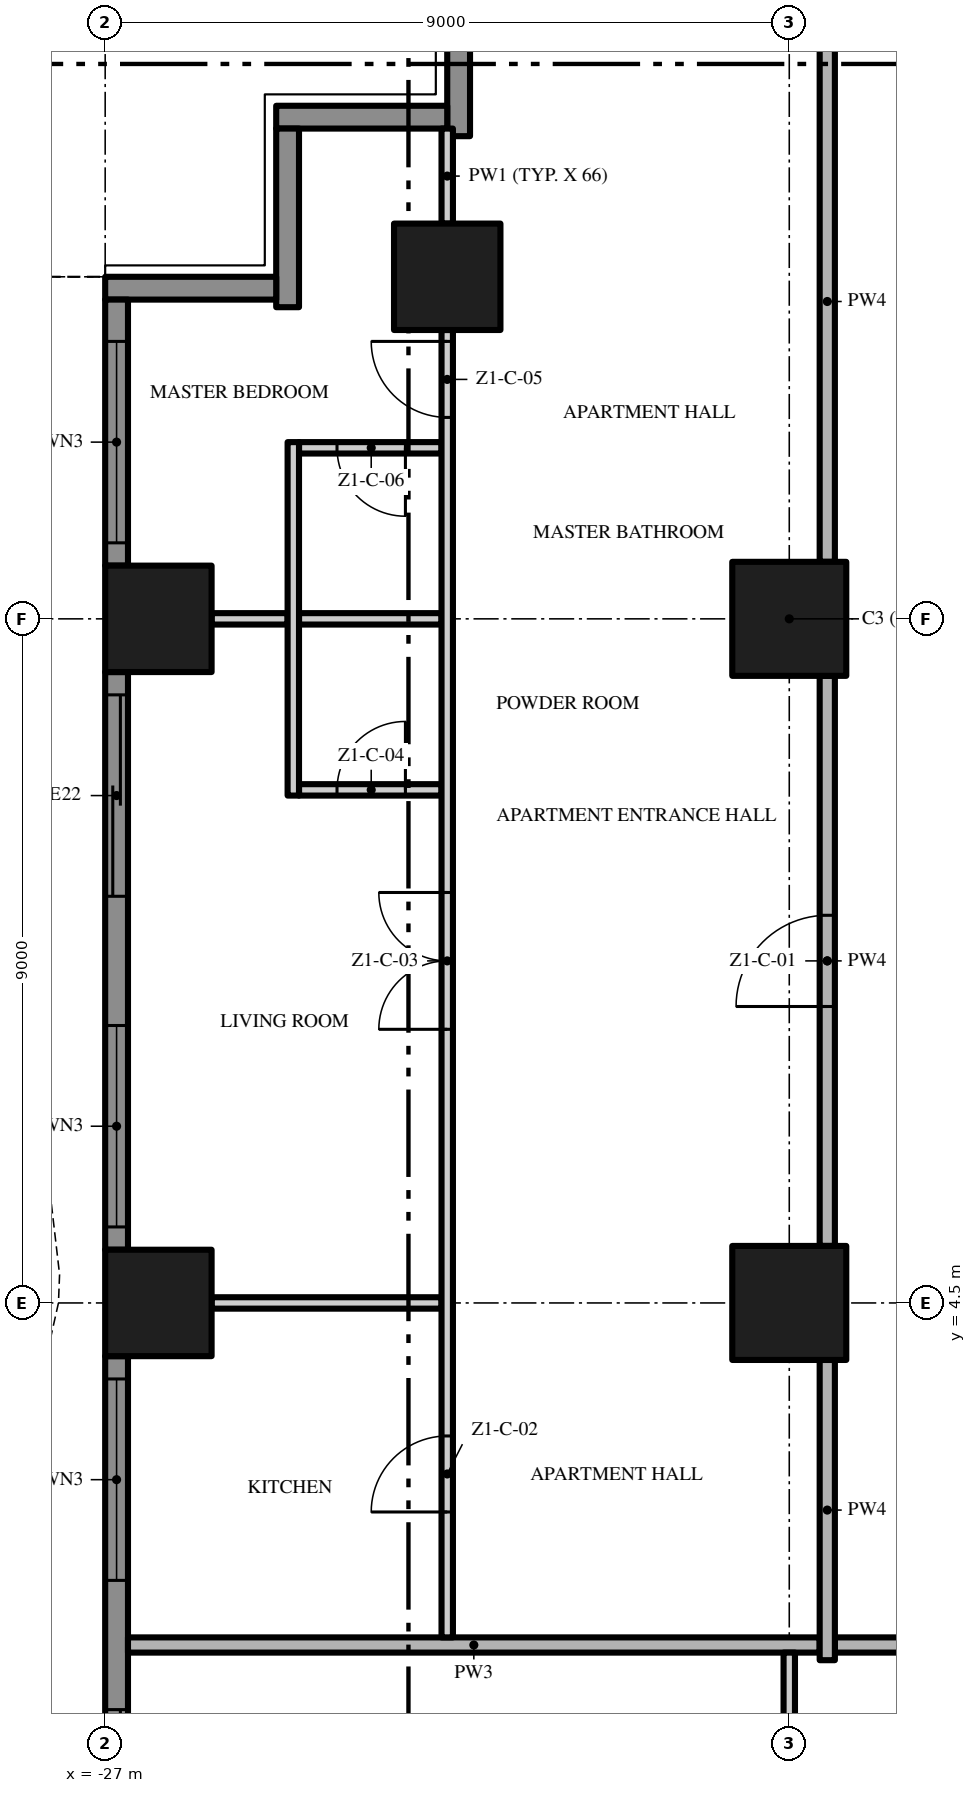
"""IFC4 building model, lengths in metres.
Left out: names, types, materials, properties, quantities, classifications, styles, units other than length and angle.
Written with IfcOpenShell. Run it as: python <this file> out.ifc"""

import sys

from ifc_helpers import new_model, si_unit, direction, frame, frame_2d, origin, origin_2d, place, context, subcontext, project, spatial, polyline, rectangle, outline, extrude, element, fill, save


model = new_model("IFC4")
c1 = context("Model", 3, precision=1e-05, world=origin(), true_north=direction((0.0, 1.0)))
c2 = subcontext(c1, "Body", "Model", "MODEL_VIEW")
j1 = project(units=[si_unit("LENGTHUNIT", "METRE"), si_unit("PLANEANGLEUNIT", "RADIAN")], contexts=[c1])
p1 = place(None, origin())
s1 = spatial("IfcSite", under=j1, at=p1, CompositionType="ELEMENT")
p2 = place(p1, origin())
s2 = spatial("IfcBuilding", under=s1, at=p2, CompositionType="ELEMENT")
p3 = place(p2, frame((0.0, 0.0, 41.6)))
s3 = spatial("IfcBuildingStorey", under=s2, at=p3, CompositionType="ELEMENT", Elevation=41.6)
for number, where, z_axis, x_axis in (
    (1, (-18.0, 13.5, 0.0), (0.0, 0.0, 1.0), (1.0, 0.0, 0.0)),
    (2, (-18.0, 4.5, 0.0), (0.0, 0.0, 1.0), (1.0, 0.0, 0.0)),
):
    element("IfcColumn", number, at=place(p3, frame(where, z_axis=z_axis, x_axis=x_axis)), inside=s3, PredefinedType="COLUMN", context=c2, shape_type="SweptSolid", body=[
        extrude(rectangle(XDim=1.5, YDim=1.5, at=origin_2d()), origin(), (0.0, 0.0, 1.0), 3.5),
    ])
for number, where, z_axis, x_axis in (
    (3, (-26.3, 13.5, 0.0), (0.0, 0.0, 1.0), (1.0, 0.0, 0.0)),
    (4, (-22.5, 18.0, 0.0), (0.0, 0.0, 1.0), (1.0, 0.0, 0.0)),
    (5, (-26.3, 4.5, 0.0), (0.0, 0.0, 1.0), (1.0, 0.0, 0.0)),
):
    element("IfcColumn", number, at=place(p3, frame(where, z_axis=z_axis, x_axis=x_axis)), inside=s3, PredefinedType="COLUMN", context=c2, shape_type="SweptSolid", body=[
        extrude(rectangle(XDim=1.4, YDim=1.4, at=origin_2d()), origin(), (0.0, 0.0, 1.0), 3.5),
    ])
p4 = place(p3, frame((-22.35, 19.85, 0.0), z_axis=(0.0, 0.0, 1.0), x_axis=(0.0, 1.0, 0.0)))
e6 = element("IfcWall", 6, at=p4, inside=s3, PredefinedType="SOLIDWALL", context=c2, shape_type="SweptSolid", body=[
    extrude(rectangle(XDim=2.35, YDim=0.3, at=frame_2d((1.175, 0.0))), origin(), (0.0, 0.0, 1.0), 3.5),
])
p5 = place(p3, frame((-24.75, 20.1, 0.0), z_axis=(0.0, 0.0, 1.0), x_axis=(1.0, 0.0, 0.0)))
e7 = element("IfcWall", 7, at=p5, inside=s3, PredefinedType="SOLIDWALL", context=c2, shape_type="SweptSolid", body=[
    extrude(rectangle(XDim=2.25, YDim=0.3, at=frame_2d((1.125, 0.0))), origin(), (0.0, 0.0, 1.0), 3.5),
])
p6 = place(p3, frame((-24.6, 17.6, 0.0), z_axis=(0.0, 0.0, 1.0), x_axis=(0.0, 1.0, 0.0)))
e8 = element("IfcWall", 8, at=p6, inside=s3, PredefinedType="SOLIDWALL", context=c2, shape_type="SweptSolid", body=[
    extrude(rectangle(XDim=2.35, YDim=0.3, at=frame_2d((1.175, 0.0))), origin(), (0.0, 0.0, 1.0), 3.5),
])
p7 = place(p3, frame((-27.0, 17.85, 0.0), z_axis=(0.0, 0.0, 1.0), x_axis=(1.0, 0.0, 0.0)))
e9 = element("IfcWall", 9, at=p7, inside=s3, PredefinedType="SOLIDWALL", context=c2, shape_type="SweptSolid", body=[
    extrude(rectangle(XDim=2.25, YDim=0.3, at=frame_2d((1.125, 0.0))), origin(), (0.0, 0.0, 1.0), 3.5),
])
p8 = place(p3, frame((-26.85, 14.2, 0.0), z_axis=(0.0, 0.0, 1.0), x_axis=(0.0, 1.0, 0.0)))
e10 = element("IfcWall", 10, at=p8, inside=s3, PredefinedType="SOLIDWALL", context=c2, shape_type="SweptSolid", body=[
    extrude(rectangle(XDim=3.5, YDim=0.3, at=frame_2d((1.75, 0.0))), origin(), (0.0, 0.0, 1.0), 3.5),
])
p9 = place(p8, frame((0.3, 0.0, 0.45)))
e11 = element("IfcOpeningElement", 11, at=p9, cuts=e10, PredefinedType="OPENING", context=c2, shape_type="SweptSolid", body=[
    extrude(rectangle(XDim=2.65, YDim=2.65, at=frame_2d((1.325, 1.325))), frame((0.0, 0.16, 0.0), z_axis=(0.0, -1.0, 0.0), x_axis=(1.0, 0.0, 0.0)), (0.0, 0.0, 1.0), 0.32),
])
p10 = place(p3, frame((-26.85, 5.2, 0.0), z_axis=(0.0, 0.0, 1.0), x_axis=(0.0, 1.0, 0.0)))
e12 = element("IfcWall", 12, at=p10, inside=s3, PredefinedType="SOLIDWALL", context=c2, shape_type="SweptSolid", body=[
    extrude(rectangle(XDim=7.6, YDim=0.3, at=frame_2d((3.8, 0.0))), origin(), (0.0, 0.0, 1.0), 3.5),
])
p11 = place(p10, frame((4.65, 0.0, 0.0)))
e13 = element("IfcOpeningElement", 13, at=p11, cuts=e12, PredefinedType="OPENING", context=c2, shape_type="SweptSolid", body=[
    extrude(rectangle(XDim=2.65, YDim=2.4, at=frame_2d((1.325, 1.2))), frame((0.0, 0.16, 0.0), z_axis=(0.0, -1.0, 0.0), x_axis=(1.0, 0.0, 0.0)), (0.0, 0.0, 1.0), 0.32),
])
p12 = place(p10, frame((0.3, 0.0, 0.45)))
e14 = element("IfcOpeningElement", 14, at=p12, cuts=e12, PredefinedType="OPENING", context=c2, shape_type="SweptSolid", body=[
    extrude(rectangle(XDim=2.65, YDim=2.65, at=frame_2d((1.325, 1.325))), frame((0.0, 0.16, 0.0), z_axis=(0.0, -1.0, 0.0), x_axis=(1.0, 0.0, 0.0)), (0.0, 0.0, 1.0), 0.32),
])
p13 = place(p3, frame((-26.85, -3.8, 0.0), z_axis=(0.0, 0.0, 1.0), x_axis=(0.0, 1.0, 0.0)))
e15 = element("IfcWall", 15, at=p13, inside=s3, PredefinedType="SOLIDWALL", context=c2, shape_type="SweptSolid", body=[
    extrude(rectangle(XDim=7.6, YDim=0.3, at=frame_2d((3.8, 0.0))), origin(), (0.0, 0.0, 1.0), 3.5),
])
p14 = place(p13, frame((4.65, 0.0, 0.45)))
e16 = element("IfcOpeningElement", 16, at=p14, cuts=e15, PredefinedType="OPENING", context=c2, shape_type="SweptSolid", body=[
    extrude(rectangle(XDim=2.65, YDim=2.65, at=frame_2d((1.325, 1.325))), frame((0.0, 0.16, 0.0), z_axis=(0.0, -1.0, 0.0), x_axis=(1.0, 0.0, 0.0)), (0.0, 0.0, 1.0), 0.32),
])
p15 = place(p13, frame((0.3, 0.0, 0.0)))
e17 = element("IfcOpeningElement", 17, at=p15, cuts=e15, PredefinedType="OPENING", context=c2, shape_type="SweptSolid", body=[
    extrude(rectangle(XDim=2.65, YDim=2.4, at=frame_2d((1.325, 1.2))), frame((0.0, 0.16, 0.0), z_axis=(0.0, -1.0, 0.0), x_axis=(1.0, 0.0, 0.0)), (0.0, 0.0, 1.0), 0.32),
])
p16 = place(p3, origin())
e18 = element("IfcWall", 18, at=p16, inside=s3, PredefinedType="USERDEFINED", context=c2, shape_type="SweptSolid", body=[
    extrude(outline(polyline([(-27.951, 18.0), (-28.612, 16.5), (-29.345, 15.0), (-29.869, 13.5), (-30.0, 12.375), (-29.985, 12.0), (-29.649, 10.5), (-28.988, 9.0), (-28.255, 7.5), (-27.731, 6.0), (-27.6, 4.875), (-27.615, 4.5), (-27.951, 3.0), (-28.612, 1.5), (-29.345, 0.0), (-29.869, -1.5), (-30.0, -2.625), (-29.985, -3.0), (-29.649, -4.5), (-28.988, -6.0), (-28.255, -7.5), (-27.731, -9.0), (-27.6, -10.125), (-27.615, -10.5), (-27.951, -12.0), (-28.612, -13.5), (-29.345, -15.0), (-29.869, -16.5), (-30.0, -17.625), (-29.985, -18.0), (-29.735, -17.99), (-29.749, -17.635), (-29.624, -16.556), (-29.114, -15.096), (-28.385, -13.605), (-27.713, -12.079), (-27.366, -10.533), (-27.349, -10.115), (-27.486, -8.944), (-28.024, -7.404), (-28.761, -5.895), (-29.41, -4.421), (-29.736, -2.967), (-29.749, -2.635), (-29.624, -1.556), (-29.114, -0.096), (-28.385, 1.395), (-27.713, 2.921), (-27.366, 4.467), (-27.349, 4.885), (-27.486, 6.056), (-28.024, 7.596), (-28.761, 9.105), (-29.41, 10.579), (-29.736, 12.033), (-29.749, 12.365), (-29.624, 13.444), (-29.114, 14.904), (-28.385, 16.395), (-27.723, 17.899), (-27.951, 18.0)])), origin(), (0.0, 0.0, 1.0), 0.9),
])
p17 = place(p3, frame((-17.4, 0.0, 0.0), z_axis=(0.0, 0.0, 1.0), x_axis=(1.0, 0.0, 0.0)))
e19 = element("IfcWall", 19, at=p17, inside=s3, PredefinedType="PARTITIONING", context=c2, shape_type="SweptSolid", body=[
    extrude(rectangle(XDim=12.8, YDim=0.2, at=frame_2d((6.4, 0.0))), origin(), (0.0, 0.0, 1.0), 3.5),
])
p18 = place(p3, frame((-26.7, 0.0, 0.0), z_axis=(0.0, 0.0, 1.0), x_axis=(1.0, 0.0, 0.0)))
e20 = element("IfcWall", 20, at=p18, inside=s3, PredefinedType="PARTITIONING", context=c2, shape_type="SweptSolid", body=[
    extrude(rectangle(XDim=9.1, YDim=0.2, at=frame_2d((4.55, 0.0))), origin(), (0.0, 0.0, 1.0), 3.5),
])
p19 = place(p3, frame((-25.6, 4.5, 0.0), z_axis=(0.0, 0.0, 1.0), x_axis=(1.0, 0.0, 0.0)))
e21 = element("IfcWall", 21, at=p19, inside=s3, PredefinedType="PARTITIONING", context=c2, shape_type="SweptSolid", body=[
    extrude(rectangle(XDim=3.025, YDim=0.15, at=frame_2d((1.512, 0.0))), origin(), (0.0, 0.0, 1.0), 3.5),
])
p20 = place(p3, frame((-24.45, 11.25, 0.0), z_axis=(0.0, 0.0, 1.0), x_axis=(1.0, 0.0, 0.0)))
e22 = element("IfcWall", 22, at=p20, inside=s3, PredefinedType="PARTITIONING", context=c2, shape_type="SweptSolid", body=[
    extrude(rectangle(XDim=1.875, YDim=0.15, at=frame_2d((0.938, 0.0))), origin(), (0.0, 0.0, 1.0), 3.5),
])
p21 = place(p20, frame((0.5, 0.0, 0.0)))
e23 = element("IfcOpeningElement", 23, at=p21, cuts=e22, PredefinedType="OPENING", context=c2, shape_type="SweptSolid", body=[
    extrude(rectangle(XDim=0.9, YDim=2.1, at=frame_2d((0.45, 1.05))), frame((0.0, 0.085, 0.0), z_axis=(0.0, -1.0, 0.0), x_axis=(1.0, 0.0, 0.0)), (0.0, 0.0, 1.0), 0.17),
])
p22 = place(p3, frame((-25.6, 13.5, 0.0), z_axis=(0.0, 0.0, 1.0), x_axis=(1.0, 0.0, 0.0)))
e24 = element("IfcWall", 24, at=p22, inside=s3, PredefinedType="PARTITIONING", context=c2, shape_type="SweptSolid", body=[
    extrude(rectangle(XDim=1.0, YDim=0.15, at=frame_2d((0.5, 0.0))), origin(), (0.0, 0.0, 1.0), 3.5),
])
p23 = place(p3, frame((-24.45, 13.5, 0.0), z_axis=(0.0, 0.0, 1.0), x_axis=(1.0, 0.0, 0.0)))
e25 = element("IfcWall", 25, at=p23, inside=s3, PredefinedType="PARTITIONING", context=c2, shape_type="SweptSolid", body=[
    extrude(rectangle(XDim=1.875, YDim=0.15, at=frame_2d((0.938, 0.0))), origin(), (0.0, 0.0, 1.0), 3.5),
])
p24 = place(p3, frame((-22.575, 15.75, 0.0), z_axis=(0.0, 0.0, 1.0), x_axis=(-1.0, 0.0, 0.0)))
e26 = element("IfcWall", 26, at=p24, inside=s3, PredefinedType="PARTITIONING", context=c2, shape_type="SweptSolid", body=[
    extrude(rectangle(XDim=1.875, YDim=0.15, at=frame_2d((0.938, 0.0))), origin(), (0.0, 0.0, 1.0), 3.5),
])
p25 = place(p24, frame((0.475, 0.0, 0.0)))
e27 = element("IfcOpeningElement", 27, at=p25, cuts=e26, PredefinedType="OPENING", context=c2, shape_type="SweptSolid", body=[
    extrude(rectangle(XDim=0.9, YDim=2.1, at=frame_2d((0.45, 1.05))), frame((0.0, 0.085, 0.0), z_axis=(0.0, -1.0, 0.0), x_axis=(1.0, 0.0, 0.0)), (0.0, 0.0, 1.0), 0.17),
])
p26 = place(p3, frame((-24.525, 11.175, 0.0), z_axis=(0.0, 0.0, 1.0), x_axis=(0.0, 1.0, 0.0)))
e28 = element("IfcWall", 28, at=p26, inside=s3, PredefinedType="PARTITIONING", context=c2, shape_type="SweptSolid", body=[
    extrude(rectangle(XDim=4.65, YDim=0.15, at=frame_2d((2.325, 0.0))), origin(), (0.0, 0.0, 1.0), 3.5),
])
p27 = place(p3, frame((-22.5, 0.1, 0.0), z_axis=(0.0, 0.0, 1.0), x_axis=(0.0, 1.0, 0.0)))
e29 = element("IfcWall", 29, at=p27, inside=s3, PredefinedType="PARTITIONING", context=c2, shape_type="SweptSolid", body=[
    extrude(rectangle(XDim=17.2, YDim=0.15, at=frame_2d((8.6, 0.0))), origin(), (0.0, 0.0, 1.0), 3.5),
])
p28 = place(p27, frame((1.65, 0.0, 0.0)))
e30 = element("IfcOpeningElement", 30, at=p28, cuts=e29, PredefinedType="OPENING", context=c2, shape_type="SweptSolid", body=[
    extrude(rectangle(XDim=1.0, YDim=2.4, at=frame_2d((0.5, 1.2))), frame((0.0, 0.085, 0.0), z_axis=(0.0, -1.0, 0.0), x_axis=(1.0, 0.0, 0.0)), (0.0, 0.0, 1.0), 0.17),
])
p29 = place(p27, frame((8.0, 0.0, 0.0)))
e31 = element("IfcOpeningElement", 31, at=p29, cuts=e29, PredefinedType="OPENING", context=c2, shape_type="SweptSolid", body=[
    extrude(rectangle(XDim=1.8, YDim=2.4, at=frame_2d((0.9, 1.2))), frame((0.0, 0.085, 0.0), z_axis=(0.0, -1.0, 0.0), x_axis=(1.0, 0.0, 0.0)), (0.0, 0.0, 1.0), 0.17),
])
p30 = place(p27, frame((16.05, 0.0, 0.0)))
e32 = element("IfcOpeningElement", 32, at=p30, cuts=e29, PredefinedType="OPENING", context=c2, shape_type="SweptSolid", body=[
    extrude(rectangle(XDim=1.0, YDim=2.4, at=frame_2d((0.5, 1.2))), frame((0.0, 0.085, 0.0), z_axis=(0.0, -1.0, 0.0), x_axis=(1.0, 0.0, 0.0)), (0.0, 0.0, 1.0), 0.17),
])
p31 = place(p3, frame((-22.5, 18.7, 0.0), z_axis=(0.0, 0.0, 1.0), x_axis=(0.0, 1.0, 0.0)))
e33 = element("IfcWall", 33, at=p31, inside=s3, PredefinedType="PARTITIONING", context=c2, shape_type="SweptSolid", body=[
    extrude(rectangle(XDim=1.25, YDim=0.15, at=frame_2d((0.625, 0.0))), origin(), (0.0, 0.0, 1.0), 3.5),
])
p32 = place(p3, frame((-18.0, -3.75, 0.0), z_axis=(0.0, 0.0, 1.0), x_axis=(0.0, 1.0, 0.0)))
e34 = element("IfcWall", 34, at=p32, inside=s3, PredefinedType="PARTITIONING", context=c2, shape_type="SweptSolid", body=[
    extrude(rectangle(XDim=3.65, YDim=0.15, at=frame_2d((1.825, 0.0))), origin(), (0.0, 0.0, 1.0), 3.5),
])
p33 = place(p32, frame((1.0, 0.0, 0.0)))
e35 = element("IfcOpeningElement", 35, at=p33, cuts=e34, PredefinedType="OPENING", context=c2, shape_type="SweptSolid", body=[
    extrude(rectangle(XDim=1.0, YDim=2.4, at=frame_2d((0.5, 1.2))), frame((0.0, 0.085, 0.0), z_axis=(0.0, -1.0, 0.0), x_axis=(1.0, 0.0, 0.0)), (0.0, 0.0, 1.0), 0.17),
])
p34 = place(p3, frame((-17.5, -0.2, 0.0), z_axis=(0.0, 0.0, 1.0), x_axis=(0.0, 1.0, 0.0)))
e36 = element("IfcWall", 36, at=p34, inside=s3, PredefinedType="PARTITIONING", context=c2, shape_type="SweptSolid", body=[
    extrude(rectangle(XDim=3.95, YDim=0.2, at=frame_2d((1.975, 0.0))), origin(), (0.0, 0.0, 1.0), 3.5),
])
p35 = place(p3, frame((-17.5, 5.25, 0.0), z_axis=(0.0, 0.0, 1.0), x_axis=(0.0, 1.0, 0.0)))
e37 = element("IfcWall", 37, at=p35, inside=s3, PredefinedType="PARTITIONING", context=c2, shape_type="SweptSolid", body=[
    extrude(rectangle(XDim=7.5, YDim=0.2, at=frame_2d((3.75, 0.0))), origin(), (0.0, 0.0, 1.0), 3.5),
])
p36 = place(p35, frame((3.15, 0.0, 0.0)))
e38 = element("IfcOpeningElement", 38, at=p36, cuts=e37, PredefinedType="OPENING", context=c2, shape_type="SweptSolid", body=[
    extrude(rectangle(XDim=1.2, YDim=2.4, at=frame_2d((0.6, 1.2))), frame((0.0, 0.11, 0.0), z_axis=(0.0, -1.0, 0.0), x_axis=(1.0, 0.0, 0.0)), (0.0, 0.0, 1.0), 0.22),
])
p37 = place(p3, frame((-17.5, 14.25, 0.0), z_axis=(0.0, 0.0, 1.0), x_axis=(0.0, 1.0, 0.0)))
e39 = element("IfcWall", 39, at=p37, inside=s3, PredefinedType="PARTITIONING", context=c2, shape_type="SweptSolid", body=[
    extrude(rectangle(XDim=6.85, YDim=0.2, at=frame_2d((3.425, 0.0))), origin(), (0.0, 0.0, 1.0), 3.5),
])
p38 = place(p9, origin())
e40 = element("IfcWindow", 40, at=p38, inside=s3, PartitioningType="SINGLE_PANEL", PredefinedType="WINDOW", context=c2, shape_type="SweptSolid", body=[
    extrude(rectangle(XDim=2.65, YDim=2.65, at=frame_2d((1.325, 1.325))), frame((0.0, 0.03, 0.0), z_axis=(0.0, -1.0, 0.0), x_axis=(1.0, 0.0, 0.0)), (0.0, 0.0, 1.0), 0.06),
])
fill(e11, e40)
p39 = place(p11, origin())
e41 = element("IfcDoor", 41, at=p39, inside=s3, OperationType="SINGLE_SWING_LEFT", PredefinedType="DOOR", context=c2, shape_type="SweptSolid", body=[
    extrude(rectangle(XDim=2.65, YDim=2.4, at=frame_2d((1.325, 1.2))), frame((0.0, 0.025, 0.0), z_axis=(0.0, -1.0, 0.0), x_axis=(1.0, 0.0, 0.0)), (0.0, 0.0, 1.0), 0.05),
])
fill(e13, e41)
p40 = place(p12, origin())
e42 = element("IfcWindow", 42, at=p40, inside=s3, PartitioningType="SINGLE_PANEL", PredefinedType="WINDOW", context=c2, shape_type="SweptSolid", body=[
    extrude(rectangle(XDim=2.65, YDim=2.65, at=frame_2d((1.325, 1.325))), frame((0.0, 0.03, 0.0), z_axis=(0.0, -1.0, 0.0), x_axis=(1.0, 0.0, 0.0)), (0.0, 0.0, 1.0), 0.06),
])
fill(e14, e42)
p41 = place(p14, origin())
e43 = element("IfcWindow", 43, at=p41, inside=s3, PartitioningType="SINGLE_PANEL", PredefinedType="WINDOW", context=c2, shape_type="SweptSolid", body=[
    extrude(rectangle(XDim=2.65, YDim=2.65, at=frame_2d((1.325, 1.325))), frame((0.0, 0.03, 0.0), z_axis=(0.0, -1.0, 0.0), x_axis=(1.0, 0.0, 0.0)), (0.0, 0.0, 1.0), 0.06),
])
fill(e16, e43)
p42 = place(p15, origin())
e44 = element("IfcDoor", 44, at=p42, inside=s3, OperationType="SINGLE_SWING_LEFT", PredefinedType="DOOR", context=c2, shape_type="SweptSolid", body=[
    extrude(rectangle(XDim=2.65, YDim=2.4, at=frame_2d((1.325, 1.2))), frame((0.0, 0.025, 0.0), z_axis=(0.0, -1.0, 0.0), x_axis=(1.0, 0.0, 0.0)), (0.0, 0.0, 1.0), 0.05),
])
fill(e17, e44)
p43 = place(p36, origin())
e45 = element("IfcDoor", 45, at=p43, inside=s3, OperationType="SINGLE_SWING_LEFT", PredefinedType="DOOR", context=c2, shape_type="SweptSolid", body=[
    extrude(rectangle(XDim=1.2, YDim=2.4, at=frame_2d((0.6, 1.2))), frame((0.0, 0.025, 0.0), z_axis=(0.0, -1.0, 0.0), x_axis=(1.0, 0.0, 0.0)), (0.0, 0.0, 1.0), 0.05),
])
fill(e38, e45)
p44 = place(p28, origin())
e46 = element("IfcDoor", 46, at=p44, inside=s3, OperationType="SINGLE_SWING_LEFT", PredefinedType="DOOR", context=c2, shape_type="SweptSolid", body=[
    extrude(rectangle(XDim=1.0, YDim=2.4, at=frame_2d((0.5, 1.2))), frame((0.0, 0.025, 0.0), z_axis=(0.0, -1.0, 0.0), x_axis=(1.0, 0.0, 0.0)), (0.0, 0.0, 1.0), 0.05),
])
fill(e30, e46)
p45 = place(p29, origin())
e47 = element("IfcDoor", 47, at=p45, inside=s3, OperationType="DOUBLE_DOOR_SINGLE_SWING", PredefinedType="DOOR", context=c2, shape_type="SweptSolid", body=[
    extrude(rectangle(XDim=1.8, YDim=2.4, at=frame_2d((0.9, 1.2))), frame((0.0, 0.025, 0.0), z_axis=(0.0, -1.0, 0.0), x_axis=(1.0, 0.0, 0.0)), (0.0, 0.0, 1.0), 0.05),
])
fill(e31, e47)
p46 = place(p21, origin())
e48 = element("IfcDoor", 48, at=p46, inside=s3, OperationType="SINGLE_SWING_RIGHT", PredefinedType="DOOR", context=c2, shape_type="SweptSolid", body=[
    extrude(rectangle(XDim=0.9, YDim=2.1, at=frame_2d((0.45, 1.05))), frame((0.0, 0.025, 0.0), z_axis=(0.0, -1.0, 0.0), x_axis=(1.0, 0.0, 0.0)), (0.0, 0.0, 1.0), 0.05),
])
fill(e23, e48)
p47 = place(p30, origin())
e49 = element("IfcDoor", 49, at=p47, inside=s3, OperationType="SINGLE_SWING_RIGHT", PredefinedType="DOOR", context=c2, shape_type="SweptSolid", body=[
    extrude(rectangle(XDim=1.0, YDim=2.4, at=frame_2d((0.5, 1.2))), frame((0.0, 0.025, 0.0), z_axis=(0.0, -1.0, 0.0), x_axis=(1.0, 0.0, 0.0)), (0.0, 0.0, 1.0), 0.05),
])
fill(e32, e49)
p48 = place(p25, origin())
e50 = element("IfcDoor", 50, at=p48, inside=s3, OperationType="SINGLE_SWING_LEFT", PredefinedType="DOOR", context=c2, shape_type="SweptSolid", body=[
    extrude(rectangle(XDim=0.9, YDim=2.1, at=frame_2d((0.45, 1.05))), frame((0.0, 0.025, 0.0), z_axis=(0.0, -1.0, 0.0), x_axis=(1.0, 0.0, 0.0)), (0.0, 0.0, 1.0), 0.05),
])
fill(e27, e50)
save(model, sys.argv[1])
